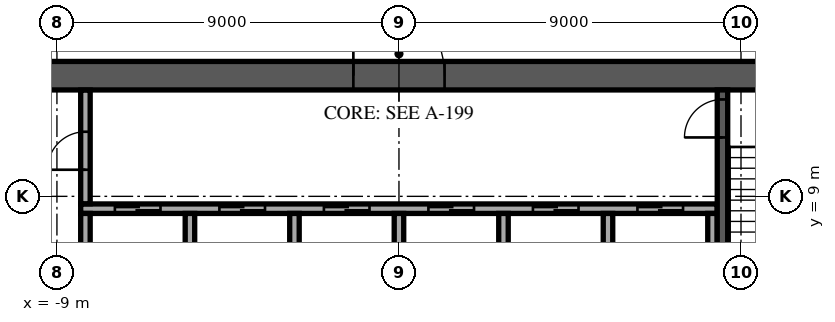
"""IFC4 building model, lengths in metres.
Left out: names, types, materials, properties, quantities, classifications, styles, units other than length and angle.
Written with IfcOpenShell. Run it as: python <this file> out.ifc"""

import sys

from ifc_helpers import new_model, si_unit, direction, frame, frame_2d, origin, place, context, subcontext, project, spatial, rectangle, extrude, element, fill, save


model = new_model("IFC4")
c1 = context("Model", 3, precision=1e-05, world=origin(), true_north=direction((0.0, 1.0)))
c2 = subcontext(c1, "Body", "Model", "MODEL_VIEW")
j1 = project(units=[si_unit("LENGTHUNIT", "METRE"), si_unit("PLANEANGLEUNIT", "RADIAN")], contexts=[c1])
p1 = place(None, origin())
s1 = spatial("IfcSite", under=j1, at=p1, CompositionType="ELEMENT")
p2 = place(p1, origin())
s2 = spatial("IfcBuilding", under=s1, at=p2, CompositionType="ELEMENT")
p3 = place(p2, frame((0.0, 0.0, 274.9)))
s3 = spatial("IfcBuildingStorey", under=s2, at=p3, CompositionType="ELEMENT", Elevation=274.9)
p4 = place(p3, frame((-12.55, 12.175, 0.0), z_axis=(0.0, 0.0, 1.0), x_axis=(1.0, 0.0, 0.0)))
e1 = element("IfcWall", 1, at=p4, inside=s3, PredefinedType="SHEAR", context=c2, shape_type="SweptSolid", body=[
    extrude(rectangle(XDim=25.1, YDim=0.75, at=frame_2d((12.55, 0.0))), origin(), (0.0, 0.0, 1.0), 3.64),
])
p5 = place(p4, frame((11.35, 0.0, 0.0)))
e2 = element("IfcOpeningElement", 2, at=p5, cuts=e1, PredefinedType="OPENING", context=c2, shape_type="SweptSolid", body=[
    extrude(rectangle(XDim=2.4, YDim=2.4, at=frame_2d((1.2, 1.2))), frame((0.0, 0.385, 0.0), z_axis=(0.0, -1.0, 0.0), x_axis=(1.0, 0.0, 0.0)), (0.0, 0.0, 1.0), 0.77),
])
p6 = place(p4, frame((22.175, 0.0, 0.0)))
e3 = element("IfcOpeningElement", 3, at=p6, cuts=e1, PredefinedType="OPENING", context=c2, shape_type="SweptSolid", body=[
    extrude(rectangle(XDim=1.2, YDim=2.1, at=frame_2d((0.6, 1.05))), frame((0.0, 0.385, 0.0), z_axis=(0.0, -1.0, 0.0), x_axis=(1.0, 0.0, 0.0)), (0.0, 0.0, 1.0), 0.77),
])
p7 = place(p4, frame((1.15, 0.0, 0.0)))
e4 = element("IfcOpeningElement", 4, at=p7, cuts=e1, PredefinedType="OPENING", context=c2, shape_type="SweptSolid", body=[
    extrude(rectangle(XDim=1.0, YDim=2.1, at=frame_2d((0.5, 1.05))), frame((0.0, 0.385, 0.0), z_axis=(0.0, -1.0, 0.0), x_axis=(1.0, 0.0, 0.0)), (0.0, 0.0, 1.0), 0.77),
])
p8 = place(p3, frame((-8.375, 8.675, 0.0), z_axis=(0.0, 0.0, 1.0), x_axis=(1.0, 0.0, 0.0)))
e5 = element("IfcWall", 5, at=p8, inside=s3, PredefinedType="SOLIDWALL", context=c2, shape_type="SweptSolid", body=[
    extrude(rectangle(XDim=16.75, YDim=0.25, at=frame_2d((8.375, 0.0))), origin(), (0.0, 0.0, 1.0), 3.64),
])
p9 = place(p8, frame((0.9, 0.0, 0.0)))
e6 = element("IfcOpeningElement", 6, at=p9, cuts=e5, PredefinedType="OPENING", context=c2, shape_type="SweptSolid", body=[
    extrude(rectangle(XDim=1.2, YDim=2.1, at=frame_2d((0.6, 1.05))), frame((0.0, 0.135, 0.0), z_axis=(0.0, -1.0, 0.0), x_axis=(1.0, 0.0, 0.0)), (0.0, 0.0, 1.0), 0.27),
])
p10 = place(p8, frame((3.65, 0.0, 0.0)))
e7 = element("IfcOpeningElement", 7, at=p10, cuts=e5, PredefinedType="OPENING", context=c2, shape_type="SweptSolid", body=[
    extrude(rectangle(XDim=1.2, YDim=2.1, at=frame_2d((0.6, 1.05))), frame((0.0, 0.135, 0.0), z_axis=(0.0, -1.0, 0.0), x_axis=(1.0, 0.0, 0.0)), (0.0, 0.0, 1.0), 0.27),
])
p11 = place(p8, frame((6.4, 0.0, 0.0)))
e8 = element("IfcOpeningElement", 8, at=p11, cuts=e5, PredefinedType="OPENING", context=c2, shape_type="SweptSolid", body=[
    extrude(rectangle(XDim=1.2, YDim=2.1, at=frame_2d((0.6, 1.05))), frame((0.0, 0.135, 0.0), z_axis=(0.0, -1.0, 0.0), x_axis=(1.0, 0.0, 0.0)), (0.0, 0.0, 1.0), 0.27),
])
p12 = place(p8, frame((9.15, 0.0, 0.0)))
e9 = element("IfcOpeningElement", 9, at=p12, cuts=e5, PredefinedType="OPENING", context=c2, shape_type="SweptSolid", body=[
    extrude(rectangle(XDim=1.2, YDim=2.1, at=frame_2d((0.6, 1.05))), frame((0.0, 0.135, 0.0), z_axis=(0.0, -1.0, 0.0), x_axis=(1.0, 0.0, 0.0)), (0.0, 0.0, 1.0), 0.27),
])
p13 = place(p8, frame((11.9, 0.0, 0.0)))
e10 = element("IfcOpeningElement", 10, at=p13, cuts=e5, PredefinedType="OPENING", context=c2, shape_type="SweptSolid", body=[
    extrude(rectangle(XDim=1.2, YDim=2.1, at=frame_2d((0.6, 1.05))), frame((0.0, 0.135, 0.0), z_axis=(0.0, -1.0, 0.0), x_axis=(1.0, 0.0, 0.0)), (0.0, 0.0, 1.0), 0.27),
])
p14 = place(p8, frame((14.65, 0.0, 0.0)))
e11 = element("IfcOpeningElement", 11, at=p14, cuts=e5, PredefinedType="OPENING", context=c2, shape_type="SweptSolid", body=[
    extrude(rectangle(XDim=1.2, YDim=2.1, at=frame_2d((0.6, 1.05))), frame((0.0, 0.135, 0.0), z_axis=(0.0, -1.0, 0.0), x_axis=(1.0, 0.0, 0.0)), (0.0, 0.0, 1.0), 0.27),
])
for number, where, z_axis, x_axis in (
    (12, (-8.25, 5.85, 0.0), (0.0, 0.0, 1.0), (0.0, 1.0, 0.0)),
    (13, (-5.5, 5.85, 0.0), (0.0, 0.0, 1.0), (0.0, 1.0, 0.0)),
    (14, (-2.75, 5.85, 0.0), (0.0, 0.0, 1.0), (0.0, 1.0, 0.0)),
    (15, (0.0, 5.85, 0.0), (0.0, 0.0, 1.0), (0.0, 1.0, 0.0)),
    (16, (2.75, 5.85, 0.0), (0.0, 0.0, 1.0), (0.0, 1.0, 0.0)),
    (17, (5.5, 5.85, 0.0), (0.0, 0.0, 1.0), (0.0, 1.0, 0.0)),
    (18, (8.25, 5.85, 0.0), (0.0, 0.0, 1.0), (0.0, 1.0, 0.0)),
):
    element("IfcWall", number, at=place(p3, frame(where, z_axis=z_axis, x_axis=x_axis)), inside=s3, PredefinedType="SOLIDWALL", context=c2, shape_type="SweptSolid", body=[
        extrude(rectangle(XDim=2.7, YDim=0.25, at=frame_2d((1.35, 0.0))), origin(), (0.0, 0.0, 1.0), 3.64),
    ])
p15 = place(p3, frame((8.512, 4.55, 0.0), z_axis=(0.0, 0.0, 1.0), x_axis=(0.0, 1.0, 0.0)))
e19 = element("IfcWall", 19, at=p15, inside=s3, PredefinedType="SOLIDWALL", context=c2, shape_type="SweptSolid", body=[
    extrude(rectangle(XDim=7.25, YDim=0.275, at=frame_2d((3.625, 0.0))), origin(), (0.0, 0.0, 1.0), 3.64),
])
p16 = place(p15, frame((6.0, 0.0, 0.0)))
e20 = element("IfcOpeningElement", 20, at=p16, cuts=e19, PredefinedType="OPENING", context=c2, shape_type="SweptSolid", body=[
    extrude(rectangle(XDim=1.0, YDim=2.1, at=frame_2d((0.5, 1.05))), frame((0.0, 0.147, 0.0), z_axis=(0.0, -1.0, 0.0), x_axis=(1.0, 0.0, 0.0)), (0.0, 0.0, 1.0), 0.295),
])
p17 = place(p3, frame((-8.25, 8.805, 0.0), z_axis=(0.0, 0.0, 1.0), x_axis=(0.0, 1.0, 0.0)))
e21 = element("IfcWall", 21, at=p17, inside=s3, PredefinedType="PARTITIONING", context=c2, shape_type="SweptSolid", body=[
    extrude(rectangle(XDim=2.99, YDim=0.25, at=frame_2d((1.495, 0.0))), origin(), (0.0, 0.0, 1.0), 3.64),
])
p18 = place(p17, frame((0.895, 0.0, 0.0)))
e22 = element("IfcOpeningElement", 22, at=p18, cuts=e21, PredefinedType="OPENING", context=c2, shape_type="SweptSolid", body=[
    extrude(rectangle(XDim=1.0, YDim=2.1, at=frame_2d((0.5, 1.05))), frame((0.0, 0.135, 0.0), z_axis=(0.0, -1.0, 0.0), x_axis=(1.0, 0.0, 0.0)), (0.0, 0.0, 1.0), 0.27),
])
p19 = place(p3, frame((-9.159, 32.618, 0.0), z_axis=(0.0, 0.0, 1.0), x_axis=(-0.469470468388, -0.88294817476, 0.0)))
e23 = element("IfcWall", 23, at=p19, inside=s3, PredefinedType="STANDARD", context=c2, shape_type="SweptSolid", body=[
    extrude(rectangle(XDim=48.843, YDim=0.6, at=frame_2d((24.422, 0.0))), origin(), (0.0, 0.0, 1.0), 3.64),
])
p20 = place(p19, frame((1.22, 0.0, 0.9)))
e24 = element("IfcOpeningElement", 24, at=p20, cuts=e23, PredefinedType="OPENING", context=c2, shape_type="SweptSolid", body=[
    extrude(rectangle(XDim=2.0, YDim=2.1, at=frame_2d((1.0, 1.05))), frame((0.0, 0.31, 0.0), z_axis=(0.0, -1.0, 0.0), x_axis=(1.0, 0.0, 0.0)), (0.0, 0.0, 1.0), 0.62),
])
p21 = place(p19, frame((5.66, 0.0, 0.9)))
e25 = element("IfcOpeningElement", 25, at=p21, cuts=e23, PredefinedType="OPENING", context=c2, shape_type="SweptSolid", body=[
    extrude(rectangle(XDim=2.0, YDim=2.1, at=frame_2d((1.0, 1.05))), frame((0.0, 0.31, 0.0), z_axis=(0.0, -1.0, 0.0), x_axis=(1.0, 0.0, 0.0)), (0.0, 0.0, 1.0), 0.62),
])
p22 = place(p19, frame((10.101, 0.0, 0.9)))
e26 = element("IfcOpeningElement", 26, at=p22, cuts=e23, PredefinedType="OPENING", context=c2, shape_type="SweptSolid", body=[
    extrude(rectangle(XDim=2.0, YDim=2.1, at=frame_2d((1.0, 1.05))), frame((0.0, 0.31, 0.0), z_axis=(0.0, -1.0, 0.0), x_axis=(1.0, 0.0, 0.0)), (0.0, 0.0, 1.0), 0.62),
])
p23 = place(p19, frame((14.541, 0.0, 0.9)))
e27 = element("IfcOpeningElement", 27, at=p23, cuts=e23, PredefinedType="OPENING", context=c2, shape_type="SweptSolid", body=[
    extrude(rectangle(XDim=2.0, YDim=2.1, at=frame_2d((1.0, 1.05))), frame((0.0, 0.31, 0.0), z_axis=(0.0, -1.0, 0.0), x_axis=(1.0, 0.0, 0.0)), (0.0, 0.0, 1.0), 0.62),
])
p24 = place(p19, frame((18.981, 0.0, 0.9)))
e28 = element("IfcOpeningElement", 28, at=p24, cuts=e23, PredefinedType="OPENING", context=c2, shape_type="SweptSolid", body=[
    extrude(rectangle(XDim=2.0, YDim=2.1, at=frame_2d((1.0, 1.05))), frame((0.0, 0.31, 0.0), z_axis=(0.0, -1.0, 0.0), x_axis=(1.0, 0.0, 0.0)), (0.0, 0.0, 1.0), 0.62),
])
p25 = place(p19, frame((23.422, 0.0, 0.9)))
e29 = element("IfcOpeningElement", 29, at=p25, cuts=e23, PredefinedType="OPENING", context=c2, shape_type="SweptSolid", body=[
    extrude(rectangle(XDim=2.0, YDim=2.1, at=frame_2d((1.0, 1.05))), frame((0.0, 0.31, 0.0), z_axis=(0.0, -1.0, 0.0), x_axis=(1.0, 0.0, 0.0)), (0.0, 0.0, 1.0), 0.62),
])
p26 = place(p19, frame((27.862, 0.0, 0.9)))
e30 = element("IfcOpeningElement", 30, at=p26, cuts=e23, PredefinedType="OPENING", context=c2, shape_type="SweptSolid", body=[
    extrude(rectangle(XDim=2.0, YDim=2.1, at=frame_2d((1.0, 1.05))), frame((0.0, 0.31, 0.0), z_axis=(0.0, -1.0, 0.0), x_axis=(1.0, 0.0, 0.0)), (0.0, 0.0, 1.0), 0.62),
])
p27 = place(p19, frame((32.302, 0.0, 0.9)))
e31 = element("IfcOpeningElement", 31, at=p27, cuts=e23, PredefinedType="OPENING", context=c2, shape_type="SweptSolid", body=[
    extrude(rectangle(XDim=2.0, YDim=2.1, at=frame_2d((1.0, 1.05))), frame((0.0, 0.31, 0.0), z_axis=(0.0, -1.0, 0.0), x_axis=(1.0, 0.0, 0.0)), (0.0, 0.0, 1.0), 0.62),
])
p28 = place(p19, frame((36.742, 0.0, 0.9)))
e32 = element("IfcOpeningElement", 32, at=p28, cuts=e23, PredefinedType="OPENING", context=c2, shape_type="SweptSolid", body=[
    extrude(rectangle(XDim=2.0, YDim=2.1, at=frame_2d((1.0, 1.05))), frame((0.0, 0.31, 0.0), z_axis=(0.0, -1.0, 0.0), x_axis=(1.0, 0.0, 0.0)), (0.0, 0.0, 1.0), 0.62),
])
p29 = place(p19, frame((41.183, 0.0, 0.9)))
e33 = element("IfcOpeningElement", 33, at=p29, cuts=e23, PredefinedType="OPENING", context=c2, shape_type="SweptSolid", body=[
    extrude(rectangle(XDim=2.0, YDim=2.1, at=frame_2d((1.0, 1.05))), frame((0.0, 0.31, 0.0), z_axis=(0.0, -1.0, 0.0), x_axis=(1.0, 0.0, 0.0)), (0.0, 0.0, 1.0), 0.62),
])
p30 = place(p19, frame((45.623, 0.0, 0.9)))
e34 = element("IfcOpeningElement", 34, at=p30, cuts=e23, PredefinedType="OPENING", context=c2, shape_type="SweptSolid", body=[
    extrude(rectangle(XDim=2.0, YDim=2.1, at=frame_2d((1.0, 1.05))), frame((0.0, 0.31, 0.0), z_axis=(0.0, -1.0, 0.0), x_axis=(1.0, 0.0, 0.0)), (0.0, 0.0, 1.0), 0.62),
])
p31 = place(p3, frame((9.233, -32.479, 0.0), z_axis=(0.0, 0.0, 1.0), x_axis=(0.469468429065, 0.882949259081, 0.0)))
e35 = element("IfcWall", 35, at=p31, inside=s3, PredefinedType="STANDARD", context=c2, shape_type="SweptSolid", body=[
    extrude(rectangle(XDim=48.686, YDim=0.6, at=frame_2d((24.343, 0.0))), origin(), (0.0, 0.0, 1.0), 3.64),
])
p32 = place(p31, frame((1.213, 0.0, 0.9)))
e36 = element("IfcOpeningElement", 36, at=p32, cuts=e35, PredefinedType="OPENING", context=c2, shape_type="SweptSolid", body=[
    extrude(rectangle(XDim=2.0, YDim=2.1, at=frame_2d((1.0, 1.05))), frame((0.0, 0.31, 0.0), z_axis=(0.0, -1.0, 0.0), x_axis=(1.0, 0.0, 0.0)), (0.0, 0.0, 1.0), 0.62),
])
p33 = place(p31, frame((5.639, 0.0, 0.9)))
e37 = element("IfcOpeningElement", 37, at=p33, cuts=e35, PredefinedType="OPENING", context=c2, shape_type="SweptSolid", body=[
    extrude(rectangle(XDim=2.0, YDim=2.1, at=frame_2d((1.0, 1.05))), frame((0.0, 0.31, 0.0), z_axis=(0.0, -1.0, 0.0), x_axis=(1.0, 0.0, 0.0)), (0.0, 0.0, 1.0), 0.62),
])
p34 = place(p31, frame((10.065, 0.0, 0.9)))
e38 = element("IfcOpeningElement", 38, at=p34, cuts=e35, PredefinedType="OPENING", context=c2, shape_type="SweptSolid", body=[
    extrude(rectangle(XDim=2.0, YDim=2.1, at=frame_2d((1.0, 1.05))), frame((0.0, 0.31, 0.0), z_axis=(0.0, -1.0, 0.0), x_axis=(1.0, 0.0, 0.0)), (0.0, 0.0, 1.0), 0.62),
])
p35 = place(p31, frame((14.491, 0.0, 0.9)))
e39 = element("IfcOpeningElement", 39, at=p35, cuts=e35, PredefinedType="OPENING", context=c2, shape_type="SweptSolid", body=[
    extrude(rectangle(XDim=2.0, YDim=2.1, at=frame_2d((1.0, 1.05))), frame((0.0, 0.31, 0.0), z_axis=(0.0, -1.0, 0.0), x_axis=(1.0, 0.0, 0.0)), (0.0, 0.0, 1.0), 0.62),
])
p36 = place(p31, frame((18.917, 0.0, 0.9)))
e40 = element("IfcOpeningElement", 40, at=p36, cuts=e35, PredefinedType="OPENING", context=c2, shape_type="SweptSolid", body=[
    extrude(rectangle(XDim=2.0, YDim=2.1, at=frame_2d((1.0, 1.05))), frame((0.0, 0.31, 0.0), z_axis=(0.0, -1.0, 0.0), x_axis=(1.0, 0.0, 0.0)), (0.0, 0.0, 1.0), 0.62),
])
p37 = place(p31, frame((23.343, 0.0, 0.9)))
e41 = element("IfcOpeningElement", 41, at=p37, cuts=e35, PredefinedType="OPENING", context=c2, shape_type="SweptSolid", body=[
    extrude(rectangle(XDim=2.0, YDim=2.1, at=frame_2d((1.0, 1.05))), frame((0.0, 0.31, 0.0), z_axis=(0.0, -1.0, 0.0), x_axis=(1.0, 0.0, 0.0)), (0.0, 0.0, 1.0), 0.62),
])
p38 = place(p31, frame((27.769, 0.0, 0.9)))
e42 = element("IfcOpeningElement", 42, at=p38, cuts=e35, PredefinedType="OPENING", context=c2, shape_type="SweptSolid", body=[
    extrude(rectangle(XDim=2.0, YDim=2.1, at=frame_2d((1.0, 1.05))), frame((0.0, 0.31, 0.0), z_axis=(0.0, -1.0, 0.0), x_axis=(1.0, 0.0, 0.0)), (0.0, 0.0, 1.0), 0.62),
])
p39 = place(p31, frame((32.195, 0.0, 0.9)))
e43 = element("IfcOpeningElement", 43, at=p39, cuts=e35, PredefinedType="OPENING", context=c2, shape_type="SweptSolid", body=[
    extrude(rectangle(XDim=2.0, YDim=2.1, at=frame_2d((1.0, 1.05))), frame((0.0, 0.31, 0.0), z_axis=(0.0, -1.0, 0.0), x_axis=(1.0, 0.0, 0.0)), (0.0, 0.0, 1.0), 0.62),
])
p40 = place(p31, frame((36.621, 0.0, 0.9)))
e44 = element("IfcOpeningElement", 44, at=p40, cuts=e35, PredefinedType="OPENING", context=c2, shape_type="SweptSolid", body=[
    extrude(rectangle(XDim=2.0, YDim=2.1, at=frame_2d((1.0, 1.05))), frame((0.0, 0.31, 0.0), z_axis=(0.0, -1.0, 0.0), x_axis=(1.0, 0.0, 0.0)), (0.0, 0.0, 1.0), 0.62),
])
p41 = place(p31, frame((41.047, 0.0, 0.9)))
e45 = element("IfcOpeningElement", 45, at=p41, cuts=e35, PredefinedType="OPENING", context=c2, shape_type="SweptSolid", body=[
    extrude(rectangle(XDim=2.0, YDim=2.1, at=frame_2d((1.0, 1.05))), frame((0.0, 0.31, 0.0), z_axis=(0.0, -1.0, 0.0), x_axis=(1.0, 0.0, 0.0)), (0.0, 0.0, 1.0), 0.62),
])
p42 = place(p31, frame((45.473, 0.0, 0.9)))
e46 = element("IfcOpeningElement", 46, at=p42, cuts=e35, PredefinedType="OPENING", context=c2, shape_type="SweptSolid", body=[
    extrude(rectangle(XDim=2.0, YDim=2.1, at=frame_2d((1.0, 1.05))), frame((0.0, 0.31, 0.0), z_axis=(0.0, -1.0, 0.0), x_axis=(1.0, 0.0, 0.0)), (0.0, 0.0, 1.0), 0.62),
])
p43 = place(p3, frame((-8.385, 26.033, 0.0), z_axis=(0.0, 0.0, 1.0), x_axis=(0.882949433839, -0.46946810039, 0.0)))
e47 = element("IfcWall", 47, at=p43, inside=s3, PredefinedType="PARTITIONING", context=c2, shape_type="SweptSolid", body=[
    extrude(rectangle(XDim=39.325, YDim=0.15, at=frame_2d((19.662, 0.0))), origin(), (0.0, 0.0, 1.0), 3.04),
])
p44 = place(p43, frame((10.622, 0.0, 0.0)))
e48 = element("IfcOpeningElement", 48, at=p44, cuts=e47, PredefinedType="OPENING", context=c2, shape_type="SweptSolid", body=[
    extrude(rectangle(XDim=1.0, YDim=2.1, at=frame_2d((0.5, 1.05))), frame((0.0, 0.085, 0.0), z_axis=(0.0, -1.0, 0.0), x_axis=(1.0, 0.0, 0.0)), (0.0, 0.0, 1.0), 0.17),
])
p45 = place(p43, frame((16.615, 0.0, 0.0)))
e49 = element("IfcOpeningElement", 49, at=p45, cuts=e47, PredefinedType="OPENING", context=c2, shape_type="SweptSolid", body=[
    extrude(rectangle(XDim=1.0, YDim=2.1, at=frame_2d((0.5, 1.05))), frame((0.0, 0.085, 0.0), z_axis=(0.0, -1.0, 0.0), x_axis=(1.0, 0.0, 0.0)), (0.0, 0.0, 1.0), 0.17),
])
p46 = place(p43, frame((28.254, 0.0, 0.0)))
e50 = element("IfcOpeningElement", 50, at=p46, cuts=e47, PredefinedType="OPENING", context=c2, shape_type="SweptSolid", body=[
    extrude(rectangle(XDim=1.0, YDim=2.1, at=frame_2d((0.5, 1.05))), frame((0.0, 0.085, 0.0), z_axis=(0.0, -1.0, 0.0), x_axis=(1.0, 0.0, 0.0)), (0.0, 0.0, 1.0), 0.17),
])
p47 = place(p5, origin())
e51 = element("IfcDoor", 51, at=p47, inside=s3, OperationType="SINGLE_SWING_LEFT", PredefinedType="DOOR", context=c2, shape_type="SweptSolid", body=[
    extrude(rectangle(XDim=2.4, YDim=2.4, at=frame_2d((1.2, 1.2))), frame((0.0, 0.025, 0.0), z_axis=(0.0, -1.0, 0.0), x_axis=(1.0, 0.0, 0.0)), (0.0, 0.0, 1.0), 0.05),
])
fill(e2, e51)
p48 = place(p9, origin())
e52 = element("IfcDoor", 52, at=p48, inside=s3, OperationType="DOUBLE_DOOR_SLIDING", PredefinedType="DOOR", context=c2, shape_type="SweptSolid", body=[
    extrude(rectangle(XDim=1.2, YDim=2.1, at=frame_2d((0.6, 1.05))), frame((0.0, 0.025, 0.0), z_axis=(0.0, -1.0, 0.0), x_axis=(1.0, 0.0, 0.0)), (0.0, 0.0, 1.0), 0.05),
])
fill(e6, e52)
p49 = place(p10, origin())
e53 = element("IfcDoor", 53, at=p49, inside=s3, OperationType="DOUBLE_DOOR_SLIDING", PredefinedType="DOOR", context=c2, shape_type="SweptSolid", body=[
    extrude(rectangle(XDim=1.2, YDim=2.1, at=frame_2d((0.6, 1.05))), frame((0.0, 0.025, 0.0), z_axis=(0.0, -1.0, 0.0), x_axis=(1.0, 0.0, 0.0)), (0.0, 0.0, 1.0), 0.05),
])
fill(e7, e53)
p50 = place(p11, origin())
e54 = element("IfcDoor", 54, at=p50, inside=s3, OperationType="DOUBLE_DOOR_SLIDING", PredefinedType="DOOR", context=c2, shape_type="SweptSolid", body=[
    extrude(rectangle(XDim=1.2, YDim=2.1, at=frame_2d((0.6, 1.05))), frame((0.0, 0.025, 0.0), z_axis=(0.0, -1.0, 0.0), x_axis=(1.0, 0.0, 0.0)), (0.0, 0.0, 1.0), 0.05),
])
fill(e8, e54)
p51 = place(p12, origin())
e55 = element("IfcDoor", 55, at=p51, inside=s3, OperationType="DOUBLE_DOOR_SLIDING", PredefinedType="DOOR", context=c2, shape_type="SweptSolid", body=[
    extrude(rectangle(XDim=1.2, YDim=2.1, at=frame_2d((0.6, 1.05))), frame((0.0, 0.025, 0.0), z_axis=(0.0, -1.0, 0.0), x_axis=(1.0, 0.0, 0.0)), (0.0, 0.0, 1.0), 0.05),
])
fill(e9, e55)
p52 = place(p13, origin())
e56 = element("IfcDoor", 56, at=p52, inside=s3, OperationType="DOUBLE_DOOR_SLIDING", PredefinedType="DOOR", context=c2, shape_type="SweptSolid", body=[
    extrude(rectangle(XDim=1.2, YDim=2.1, at=frame_2d((0.6, 1.05))), frame((0.0, 0.025, 0.0), z_axis=(0.0, -1.0, 0.0), x_axis=(1.0, 0.0, 0.0)), (0.0, 0.0, 1.0), 0.05),
])
fill(e10, e56)
p53 = place(p14, origin())
e57 = element("IfcDoor", 57, at=p53, inside=s3, OperationType="DOUBLE_DOOR_SLIDING", PredefinedType="DOOR", context=c2, shape_type="SweptSolid", body=[
    extrude(rectangle(XDim=1.2, YDim=2.1, at=frame_2d((0.6, 1.05))), frame((0.0, 0.025, 0.0), z_axis=(0.0, -1.0, 0.0), x_axis=(1.0, 0.0, 0.0)), (0.0, 0.0, 1.0), 0.05),
])
fill(e11, e57)
p54 = place(p16, origin())
e58 = element("IfcDoor", 58, at=p54, inside=s3, OperationType="SINGLE_SWING_LEFT", PredefinedType="DOOR", context=c2, shape_type="SweptSolid", body=[
    extrude(rectangle(XDim=1.0, YDim=2.1, at=frame_2d((0.5, 1.05))), frame((0.0, 0.025, 0.0), z_axis=(0.0, -1.0, 0.0), x_axis=(1.0, 0.0, 0.0)), (0.0, 0.0, 1.0), 0.05),
])
fill(e20, e58)
p55 = place(p18, origin())
e59 = element("IfcDoor", 59, at=p55, inside=s3, OperationType="SINGLE_SWING_RIGHT", PredefinedType="DOOR", context=c2, shape_type="SweptSolid", body=[
    extrude(rectangle(XDim=1.0, YDim=2.1, at=frame_2d((0.5, 1.05))), frame((0.0, 0.025, 0.0), z_axis=(0.0, -1.0, 0.0), x_axis=(1.0, 0.0, 0.0)), (0.0, 0.0, 1.0), 0.05),
])
fill(e22, e59)
save(model, sys.argv[1])
